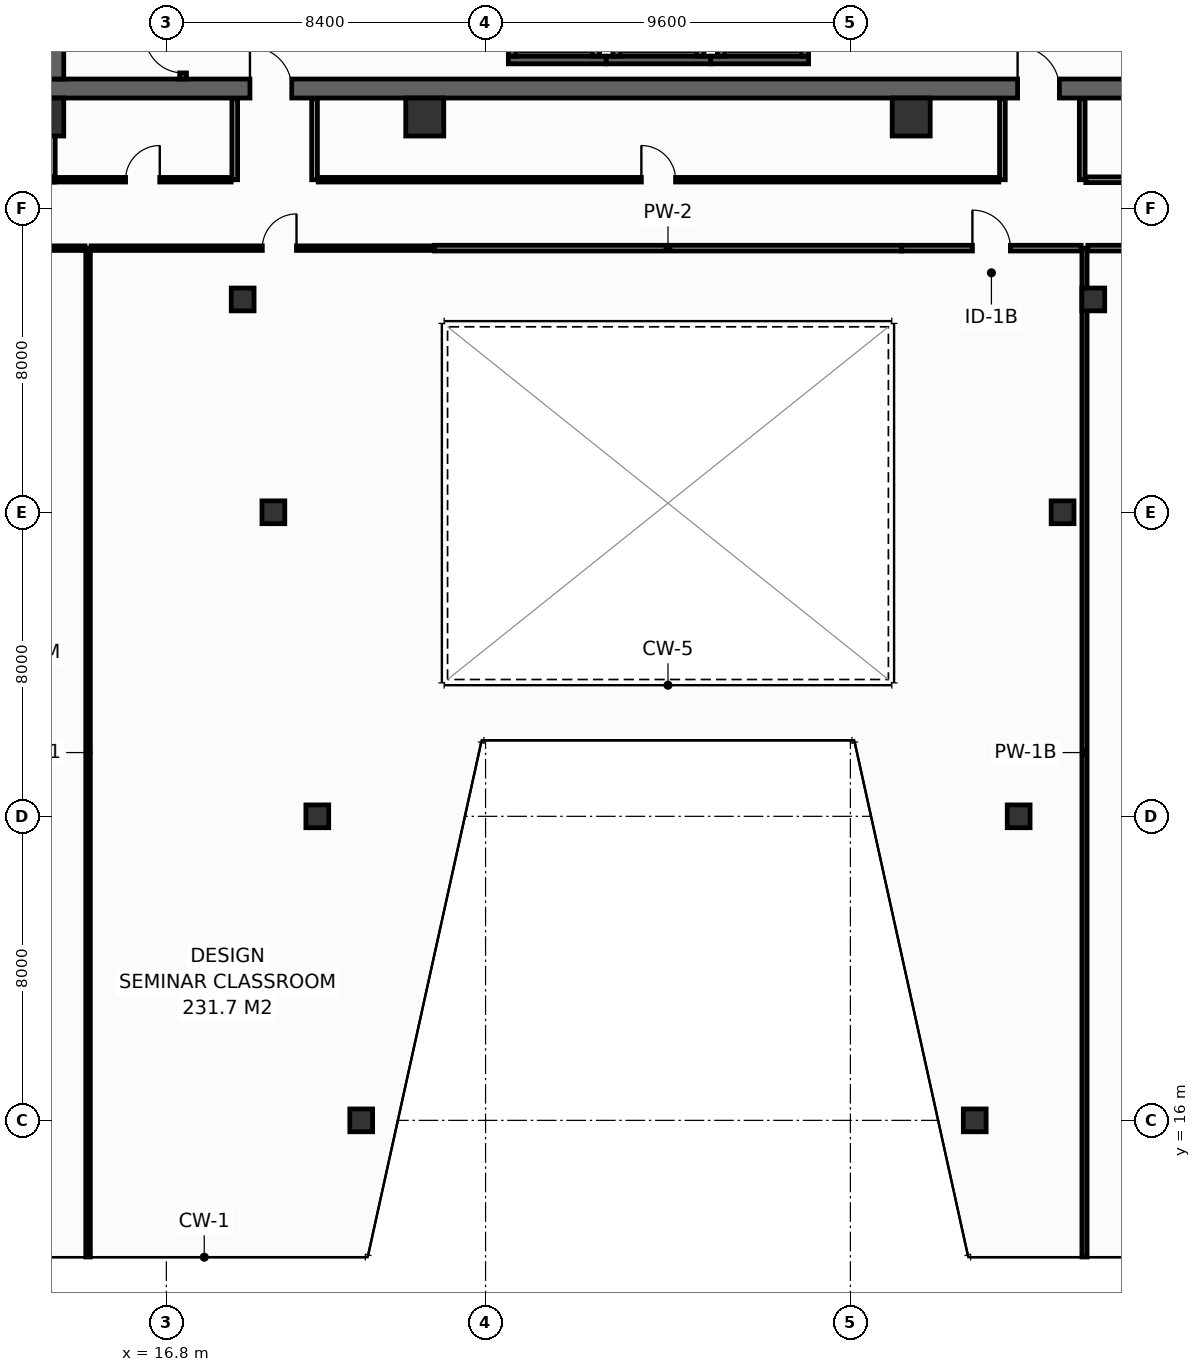
"""IFC4 building model, lengths in metres.
Left out: names, types, materials, properties, quantities, classifications, styles, units other than length and angle.
Written with IfcOpenShell. Run it as: python <this file> out.ifc"""

import sys

from ifc_helpers import new_model, si_unit, direction, frame, frame_2d, origin, origin_2d, place, context, subcontext, project, spatial, rectangle, hollow_rectangle, extrude, element, fill, save


model = new_model("IFC4")
c1 = context("Model", 3, precision=1e-05, world=origin(), true_north=direction((0.0, 1.0)))
c2 = subcontext(c1, "Body", "Model", "MODEL_VIEW")
j1 = project(units=[si_unit("LENGTHUNIT", "METRE"), si_unit("PLANEANGLEUNIT", "RADIAN")], contexts=[c1])
p1 = place(None, origin())
s1 = spatial("IfcSite", under=j1, at=p1, CompositionType="ELEMENT")
p2 = place(p1, origin())
s2 = spatial("IfcBuilding", under=s1, at=p2, CompositionType="ELEMENT")
p3 = place(p2, frame((0.0, 0.0, 171.4)))
s3 = spatial("IfcBuildingStorey", under=s2, at=p3, CompositionType="ELEMENT", Elevation=171.4)
p4 = place(p3, frame((13.6, 43.15, 0.0), z_axis=(0.0, 0.0, 1.0), x_axis=(1.0, 0.0, 0.0)))
e1 = element("IfcWall", 1, at=p4, inside=s3, PredefinedType="SHEAR", context=c2, shape_type="SweptSolid", body=[
    extrude(rectangle(XDim=32.7, YDim=0.5, at=frame_2d((16.35, 0.0))), origin(), (0.0, 0.0, 1.0), 3.55),
])
p5 = place(p4, frame((5.4, 0.0, 0.0)))
e2 = element("IfcOpeningElement", 2, at=p5, cuts=e1, PredefinedType="OPENING", context=c2, shape_type="SweptSolid", body=[
    extrude(rectangle(XDim=1.1, YDim=2.15, at=frame_2d((0.55, 1.075))), frame((0.0, 0.26, 0.0), z_axis=(0.0, -1.0, 0.0), x_axis=(1.0, 0.0, 0.0)), (0.0, 0.0, 1.0), 0.52),
])
p6 = place(p4, frame((25.6, 0.0, 0.0)))
e3 = element("IfcOpeningElement", 3, at=p6, cuts=e1, PredefinedType="OPENING", context=c2, shape_type="SweptSolid", body=[
    extrude(rectangle(XDim=1.1, YDim=2.15, at=frame_2d((0.55, 1.075))), frame((0.0, 0.26, 0.0), z_axis=(0.0, -1.0, 0.0), x_axis=(1.0, 0.0, 0.0)), (0.0, 0.0, 1.0), 0.52),
])
p7 = place(p3, frame((13.85, 43.4, 0.0), z_axis=(0.0, 0.0, 1.0), x_axis=(0.0, 1.0, 0.0)))
e4 = element("IfcWall", 4, at=p7, inside=s3, PredefinedType="SHEAR", context=c2, shape_type="SweptSolid", body=[
    extrude(rectangle(XDim=10.4, YDim=0.5, at=frame_2d((5.2, 0.0))), origin(), (0.0, 0.0, 1.0), 3.55),
])
for number, where, z_axis, x_axis in (
    (5, (13.6, 42.4, 0.0), (0.0, 0.0, 1.0), (1.0, 0.0, 0.0)),
    (6, (23.6, 42.4, 0.0), (0.0, 0.0, 1.0), (1.0, 0.0, 0.0)),
    (7, (36.4, 42.4, 0.0), (0.0, 0.0, 1.0), (1.0, 0.0, 0.0)),
):
    element("IfcColumn", number, at=place(p3, frame(where, z_axis=z_axis, x_axis=x_axis)), inside=s3, PredefinedType="COLUMN", context=c2, shape_type="SweptSolid", body=[
        extrude(hollow_rectangle(XDim=1.0, YDim=1.0, WallThickness=0.045, at=origin_2d()), origin(), (0.0, 0.0, 1.0), 3.8),
    ])
for number, where, z_axis, x_axis in (
    (8, (21.928, 16.0, 0.0), (0.0, 0.0, 1.0), (1.0, 0.0, 0.0)),
    (9, (38.072, 16.0, 0.0), (0.0, 0.0, 1.0), (1.0, 0.0, 0.0)),
    (10, (20.772, 24.0, 0.0), (0.0, 0.0, 1.0), (1.0, 0.0, 0.0)),
    (11, (39.228, 24.0, 0.0), (0.0, 0.0, 1.0), (1.0, 0.0, 0.0)),
    (12, (19.617, 32.0, 0.0), (0.0, 0.0, 1.0), (1.0, 0.0, 0.0)),
    (13, (40.383, 32.0, 0.0), (0.0, 0.0, 1.0), (1.0, 0.0, 0.0)),
    (14, (18.808, 37.6, 0.0), (0.0, 0.0, 1.0), (1.0, 0.0, 0.0)),
    (15, (41.192, 37.6, 0.0), (0.0, 0.0, 1.0), (1.0, 0.0, 0.0)),
):
    element("IfcColumn", number, at=place(p3, frame(where, z_axis=z_axis, x_axis=x_axis)), inside=s3, PredefinedType="COLUMN", context=c2, shape_type="SweptSolid", body=[
        extrude(hollow_rectangle(XDim=0.6, YDim=0.6, WallThickness=0.028, at=origin_2d()), origin(), (0.0, 0.0, 1.0), 3.8),
    ])
p8 = place(p3, frame((25.8, 43.9, 0.0), z_axis=(0.0, 0.0, 1.0), x_axis=(1.0, 0.0, 0.0)))
e16 = element("IfcWall", 16, at=p8, inside=s3, PredefinedType="SHEAR", context=c2, shape_type="SweptSolid", body=[
    extrude(rectangle(XDim=2.575, YDim=0.2, at=frame_2d((1.288, 0.0))), origin(), (0.0, 0.0, 1.0), 3.55),
])
for number, where, z_axis, x_axis in (
    (17, (25.9, 44.0, 0.0), (0.0, 0.0, 1.0), (0.0, 1.0, 0.0)),
    (18, (28.1, 44.0, 0.0), (0.0, 0.0, 1.0), (0.0, 1.0, 0.0)),
):
    element("IfcWall", number, at=place(p3, frame(where, z_axis=z_axis, x_axis=x_axis)), inside=s3, PredefinedType="SHEAR", context=c2, shape_type="SweptSolid", body=[
        extrude(rectangle(XDim=2.3, YDim=0.2, at=frame_2d((1.15, 0.0))), origin(), (0.0, 0.0, 1.0), 3.55),
    ])
p9 = place(p3, frame((28.375, 43.9, 0.0), z_axis=(0.0, 0.0, 1.0), x_axis=(1.0, 0.0, 0.0)))
e19 = element("IfcWall", 19, at=p9, inside=s3, PredefinedType="SHEAR", context=c2, shape_type="SweptSolid", body=[
    extrude(rectangle(XDim=2.75, YDim=0.2, at=frame_2d((1.375, 0.0))), origin(), (0.0, 0.0, 1.0), 3.55),
])
for number, where, z_axis, x_axis in (
    (20, (28.65, 44.0, 0.0), (0.0, 0.0, 1.0), (0.0, 1.0, 0.0)),
    (21, (30.85, 44.0, 0.0), (0.0, 0.0, 1.0), (0.0, 1.0, 0.0)),
):
    element("IfcWall", number, at=place(p3, frame(where, z_axis=z_axis, x_axis=x_axis)), inside=s3, PredefinedType="SHEAR", context=c2, shape_type="SweptSolid", body=[
        extrude(rectangle(XDim=2.3, YDim=0.2, at=frame_2d((1.15, 0.0))), origin(), (0.0, 0.0, 1.0), 3.55),
    ])
p10 = place(p3, frame((31.125, 43.9, 0.0), z_axis=(0.0, 0.0, 1.0), x_axis=(1.0, 0.0, 0.0)))
e22 = element("IfcWall", 22, at=p10, inside=s3, PredefinedType="SHEAR", context=c2, shape_type="SweptSolid", body=[
    extrude(rectangle(XDim=2.575, YDim=0.2, at=frame_2d((1.288, 0.0))), origin(), (0.0, 0.0, 1.0), 3.55),
])
for number, where, z_axis, x_axis in (
    (23, (31.4, 44.0, 0.0), (0.0, 0.0, 1.0), (0.0, 1.0, 0.0)),
    (24, (33.6, 44.0, 0.0), (0.0, 0.0, 1.0), (0.0, 1.0, 0.0)),
):
    element("IfcWall", number, at=place(p3, frame(where, z_axis=z_axis, x_axis=x_axis)), inside=s3, PredefinedType="SHEAR", context=c2, shape_type="SweptSolid", body=[
        extrude(rectangle(XDim=2.3, YDim=0.2, at=frame_2d((1.15, 0.0))), origin(), (0.0, 0.0, 1.0), 3.55),
    ])
p11 = place(p3, frame((17.24, 43.4, 0.0), z_axis=(0.0, 0.0, 1.0), x_axis=(0.0, 1.0, 0.0)))
e25 = element("IfcWall", 25, at=p11, inside=s3, PredefinedType="SHEAR", context=c2, shape_type="SweptSolid", body=[
    extrude(rectangle(XDim=10.4, YDim=0.18, at=frame_2d((5.2, 0.0))), origin(), (0.0, 0.0, 1.0), 3.55),
])
p12 = place(p11, frame((0.16, 0.0, 0.0)))
e26 = element("IfcOpeningElement", 26, at=p12, cuts=e25, PredefinedType="OPENING", context=c2, shape_type="SweptSolid", body=[
    extrude(rectangle(XDim=1.0, YDim=2.15, at=frame_2d((0.5, 1.075))), frame((0.0, 0.1, 0.0), z_axis=(0.0, -1.0, 0.0), x_axis=(1.0, 0.0, 0.0)), (0.0, 0.0, 1.0), 0.2),
])
p13 = place(p3, frame((11.5, 40.75, 0.0), z_axis=(0.0, 0.0, 1.0), x_axis=(1.0, 0.0, 0.0)))
e27 = element("IfcWall", 27, at=p13, inside=s3, PredefinedType="PARTITIONING", context=c2, shape_type="SweptSolid", body=[
    extrude(rectangle(XDim=2.35, YDim=0.12, at=frame_2d((1.175, 0.0))), origin(), (0.0, 0.0, 1.0), 3.55),
])
p14 = place(p3, frame((13.8, 40.83, 0.0), z_axis=(0.0, 0.0, 1.0), x_axis=(0.0, 1.0, 0.0)))
e28 = element("IfcWall", 28, at=p14, inside=s3, PredefinedType="PARTITIONING", context=c2, shape_type="SweptSolid", body=[
    extrude(rectangle(XDim=2.05, YDim=0.15, at=frame_2d((1.025, 0.0))), origin(), (0.0, 0.0, 1.0), 3.55),
])
for number, where, z_axis, x_axis in (
    (29, (18.6, 40.75, 0.0), (0.0, 0.0, 1.0), (0.0, 1.0, 0.0)),
    (30, (20.7, 40.75, 0.0), (0.0, 0.0, 1.0), (0.0, 1.0, 0.0)),
    (31, (38.8, 40.75, 0.0), (0.0, 0.0, 1.0), (0.0, 1.0, 0.0)),
    (32, (40.9, 40.75, 0.0), (0.0, 0.0, 1.0), (0.0, 1.0, 0.0)),
):
    element("IfcWall", number, at=place(p3, frame(where, z_axis=z_axis, x_axis=x_axis)), inside=s3, PredefinedType="PARTITIONING", context=c2, shape_type="SweptSolid", body=[
        extrude(rectangle(XDim=2.13, YDim=0.15, at=frame_2d((1.065, 0.0))), origin(), (0.0, 0.0, 1.0), 3.55),
    ])
p15 = place(p3, frame((13.85, 40.75, 0.0), z_axis=(0.0, 0.0, 1.0), x_axis=(1.0, 0.0, 0.0)))
e33 = element("IfcWall", 33, at=p15, inside=s3, PredefinedType="PARTITIONING", context=c2, shape_type="SweptSolid", body=[
    extrude(rectangle(XDim=4.655, YDim=0.12, at=frame_2d((2.327, 0.0))), origin(), (0.0, 0.0, 1.0), 3.55),
])
p16 = place(p15, frame((1.877, 0.0, 0.0)))
e34 = element("IfcOpeningElement", 34, at=p16, cuts=e33, PredefinedType="OPENING", context=c2, shape_type="SweptSolid", body=[
    extrude(rectangle(XDim=0.9, YDim=2.1, at=frame_2d((0.45, 1.05))), frame((0.0, 0.07, 0.0), z_axis=(0.0, -1.0, 0.0), x_axis=(1.0, 0.0, 0.0)), (0.0, 0.0, 1.0), 0.14),
])
p17 = place(p3, frame((20.795, 40.75, 0.0), z_axis=(0.0, 0.0, 1.0), x_axis=(1.0, 0.0, 0.0)))
e35 = element("IfcWall", 35, at=p17, inside=s3, PredefinedType="PARTITIONING", context=c2, shape_type="SweptSolid", body=[
    extrude(rectangle(XDim=17.91, YDim=0.12, at=frame_2d((8.955, 0.0))), origin(), (0.0, 0.0, 1.0), 2.835),
])
p18 = place(p17, frame((8.505, 0.0, 0.0)))
e36 = element("IfcOpeningElement", 36, at=p18, cuts=e35, PredefinedType="OPENING", context=c2, shape_type="SweptSolid", body=[
    extrude(rectangle(XDim=0.9, YDim=2.1, at=frame_2d((0.45, 1.05))), frame((0.0, 0.07, 0.0), z_axis=(0.0, -1.0, 0.0), x_axis=(1.0, 0.0, 0.0)), (0.0, 0.0, 1.0), 0.14),
])
p19 = place(p3, frame((40.995, 40.75, 0.0), z_axis=(0.0, 0.0, 1.0), x_axis=(1.0, 0.0, 0.0)))
e37 = element("IfcWall", 37, at=p19, inside=s3, PredefinedType="PARTITIONING", context=c2, shape_type="SweptSolid", body=[
    extrude(rectangle(XDim=5.155, YDim=0.15, at=frame_2d((2.577, 0.0))), origin(), (0.0, 0.0, 1.0), 3.55),
])
p20 = place(p19, frame((2.078, 0.0, 0.0)))
e38 = element("IfcOpeningElement", 38, at=p20, cuts=e37, PredefinedType="OPENING", context=c2, shape_type="SweptSolid", body=[
    extrude(rectangle(XDim=1.0, YDim=2.15, at=frame_2d((0.5, 1.075))), frame((0.0, 0.085, 0.0), z_axis=(0.0, -1.0, 0.0), x_axis=(1.0, 0.0, 0.0)), (0.0, 0.0, 1.0), 0.17),
])
p21 = place(p3, frame((14.74, 12.405, 0.0), z_axis=(0.0, 0.0, 1.0), x_axis=(0.0, 1.0, 0.0)))
e39 = element("IfcWall", 39, at=p21, inside=s3, PredefinedType="PARTITIONING", context=c2, shape_type="SweptSolid", body=[
    extrude(rectangle(XDim=26.545, YDim=0.12, at=frame_2d((13.272, 0.0))), origin(), (0.0, 0.0, 1.0), 2.835),
])
p22 = place(p3, frame((40.96, 12.405, 0.0), z_axis=(0.0, 0.0, 1.0), x_axis=(0.0, 1.0, 0.0)))
e40 = element("IfcWall", 40, at=p22, inside=s3, PredefinedType="PARTITIONING", context=c2, shape_type="SweptSolid", body=[
    extrude(rectangle(XDim=26.545, YDim=0.135, at=frame_2d((13.272, 0.0))), origin(), (0.0, 0.0, 1.0), 2.835),
])
p23 = place(p3, frame((6.363, 38.95, 0.0), z_axis=(0.0, 0.0, 1.0), x_axis=(1.0, 0.0, 0.0)))
e41 = element("IfcWall", 41, at=p23, inside=s3, PredefinedType="PARTITIONING", context=c2, shape_type="SweptSolid", body=[
    extrude(rectangle(XDim=8.297, YDim=0.12, at=frame_2d((4.148, 0.0))), origin(), (0.0, 0.0, 1.0), 3.035),
])
p24 = place(p23, frame((3.699, 0.0, 0.0)))
e42 = element("IfcOpeningElement", 42, at=p24, cuts=e41, PredefinedType="OPENING", context=c2, shape_type="SweptSolid", body=[
    extrude(rectangle(XDim=0.9, YDim=2.1, at=frame_2d((0.45, 1.05))), frame((0.0, 0.07, 0.0), z_axis=(0.0, -1.0, 0.0), x_axis=(1.0, 0.0, 0.0)), (0.0, 0.0, 1.0), 0.14),
])
p25 = place(p3, frame((14.82, 38.95, 0.0), z_axis=(0.0, 0.0, 1.0), x_axis=(1.0, 0.0, 0.0)))
e43 = element("IfcWall", 43, at=p25, inside=s3, PredefinedType="PARTITIONING", context=c2, shape_type="SweptSolid", body=[
    extrude(rectangle(XDim=9.03, YDim=0.12, at=frame_2d((4.515, 0.0))), origin(), (0.0, 0.0, 1.0), 2.835),
])
p26 = place(p25, frame((4.505, 0.0, 0.0)))
e44 = element("IfcOpeningElement", 44, at=p26, cuts=e43, PredefinedType="OPENING", context=c2, shape_type="SweptSolid", body=[
    extrude(rectangle(XDim=0.9, YDim=2.1, at=frame_2d((0.45, 1.05))), frame((0.0, 0.07, 0.0), z_axis=(0.0, -1.0, 0.0), x_axis=(1.0, 0.0, 0.0)), (0.0, 0.0, 1.0), 0.14),
])
p27 = place(p3, frame((23.85, 38.95, 0.0), z_axis=(0.0, 0.0, 1.0), x_axis=(1.0, 0.0, 0.0)))
e45 = element("IfcWall", 45, at=p27, inside=s3, PredefinedType="PARTITIONING", context=c2, shape_type="SweptSolid", body=[
    extrude(rectangle(XDim=12.3, YDim=0.15, at=frame_2d((6.15, 0.0))), origin(), (0.0, 0.0, 1.0), 3.55),
])
p28 = place(p3, frame((36.15, 38.95, 0.0), z_axis=(0.0, 0.0, 1.0), x_axis=(1.0, 0.0, 0.0)))
e46 = element("IfcWall", 46, at=p28, inside=s3, PredefinedType="PARTITIONING", context=c2, shape_type="SweptSolid", body=[
    extrude(rectangle(XDim=4.723, YDim=0.15, at=frame_2d((2.361, 0.0))), origin(), (0.0, 0.0, 1.0), 2.835),
])
p29 = place(p28, frame((1.861, 0.0, 0.0)))
e47 = element("IfcOpeningElement", 47, at=p29, cuts=e46, PredefinedType="OPENING", context=c2, shape_type="SweptSolid", body=[
    extrude(rectangle(XDim=1.0, YDim=2.15, at=frame_2d((0.5, 1.075))), frame((0.0, 0.085, 0.0), z_axis=(0.0, -1.0, 0.0), x_axis=(1.0, 0.0, 0.0)), (0.0, 0.0, 1.0), 0.17),
])
p30 = place(p3, frame((41.048, 38.95, 0.0), z_axis=(0.0, 0.0, 1.0), x_axis=(1.0, 0.0, 0.0)))
e48 = element("IfcWall", 48, at=p30, inside=s3, PredefinedType="PARTITIONING", context=c2, shape_type="SweptSolid", body=[
    extrude(rectangle(XDim=4.125, YDim=0.15, at=frame_2d((2.062, 0.0))), origin(), (0.0, 0.0, 1.0), 3.55),
])
p31 = place(p30, frame((1.538, 0.0, 0.0)))
e49 = element("IfcOpeningElement", 49, at=p31, cuts=e48, PredefinedType="OPENING", context=c2, shape_type="SweptSolid", body=[
    extrude(rectangle(XDim=1.05, YDim=2.15, at=frame_2d((0.525, 1.075))), frame((0.0, 0.085, 0.0), z_axis=(0.0, -1.0, 0.0), x_axis=(1.0, 0.0, 0.0)), (0.0, 0.0, 1.0), 0.17),
])
p32 = place(p12, origin())
e50 = element("IfcDoor", 50, at=p32, inside=s3, OperationType="SINGLE_SWING_RIGHT", PredefinedType="DOOR", context=c2, shape_type="SweptSolid", body=[
    extrude(rectangle(XDim=1.0, YDim=2.15, at=frame_2d((0.5, 1.075))), frame((0.0, 0.025, 0.0), z_axis=(0.0, -1.0, 0.0), x_axis=(1.0, 0.0, 0.0)), (0.0, 0.0, 1.0), 0.05),
])
fill(e26, e50)
p33 = place(p5, origin())
e51 = element("IfcDoor", 51, at=p33, inside=s3, OperationType="SINGLE_SWING_LEFT", PredefinedType="DOOR", context=c2, shape_type="SweptSolid", body=[
    extrude(rectangle(XDim=1.1, YDim=2.15, at=frame_2d((0.55, 1.075))), frame((0.0, 0.025, 0.0), z_axis=(0.0, -1.0, 0.0), x_axis=(1.0, 0.0, 0.0)), (0.0, 0.0, 1.0), 0.05),
])
fill(e2, e51)
p34 = place(p6, origin())
e52 = element("IfcDoor", 52, at=p34, inside=s3, OperationType="SINGLE_SWING_LEFT", PredefinedType="DOOR", context=c2, shape_type="SweptSolid", body=[
    extrude(rectangle(XDim=1.1, YDim=2.15, at=frame_2d((0.55, 1.075))), frame((0.0, 0.025, 0.0), z_axis=(0.0, -1.0, 0.0), x_axis=(1.0, 0.0, 0.0)), (0.0, 0.0, 1.0), 0.05),
])
fill(e3, e52)
p35 = place(p16, origin())
e53 = element("IfcDoor", 53, at=p35, inside=s3, OperationType="SINGLE_SWING_RIGHT", PredefinedType="DOOR", context=c2, shape_type="SweptSolid", body=[
    extrude(rectangle(XDim=0.9, YDim=2.1, at=frame_2d((0.45, 1.05))), frame((0.0, 0.025, 0.0), z_axis=(0.0, -1.0, 0.0), x_axis=(1.0, 0.0, 0.0)), (0.0, 0.0, 1.0), 0.05),
])
fill(e34, e53)
p36 = place(p18, origin())
e54 = element("IfcDoor", 54, at=p36, inside=s3, OperationType="SINGLE_SWING_LEFT", PredefinedType="DOOR", context=c2, shape_type="SweptSolid", body=[
    extrude(rectangle(XDim=0.9, YDim=2.1, at=frame_2d((0.45, 1.05))), frame((0.0, 0.025, 0.0), z_axis=(0.0, -1.0, 0.0), x_axis=(1.0, 0.0, 0.0)), (0.0, 0.0, 1.0), 0.05),
])
fill(e36, e54)
p37 = place(p26, origin())
e55 = element("IfcDoor", 55, at=p37, inside=s3, OperationType="SINGLE_SWING_RIGHT", PredefinedType="DOOR", context=c2, shape_type="SweptSolid", body=[
    extrude(rectangle(XDim=0.9, YDim=2.1, at=frame_2d((0.45, 1.05))), frame((0.0, 0.025, 0.0), z_axis=(0.0, -1.0, 0.0), x_axis=(1.0, 0.0, 0.0)), (0.0, 0.0, 1.0), 0.05),
])
fill(e44, e55)
p38 = place(p29, origin())
e56 = element("IfcDoor", 56, at=p38, inside=s3, OperationType="SINGLE_SWING_LEFT", PredefinedType="DOOR", context=c2, shape_type="SweptSolid", body=[
    extrude(rectangle(XDim=1.0, YDim=2.15, at=frame_2d((0.5, 1.075))), frame((0.0, 0.025, 0.0), z_axis=(0.0, -1.0, 0.0), x_axis=(1.0, 0.0, 0.0)), (0.0, 0.0, 1.0), 0.05),
])
fill(e47, e56)
save(model, sys.argv[1])
